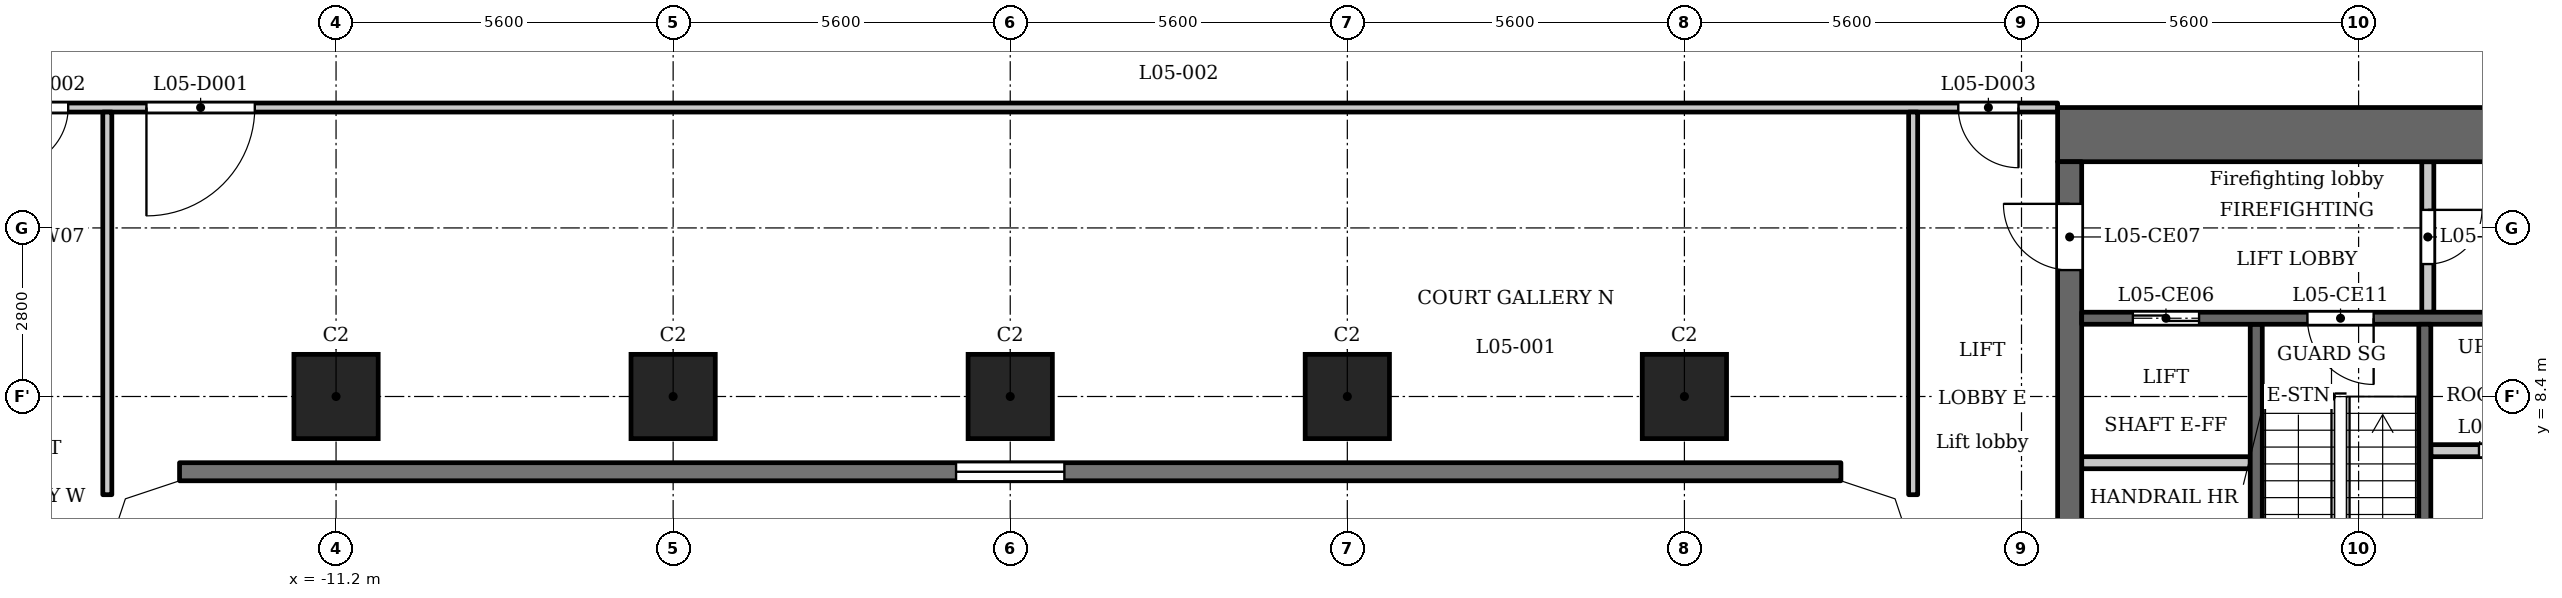
"""IFC4 building model, lengths in metres.
Left out: names, types, materials, properties, quantities, classifications, styles, units other than length and angle.
Written with IfcOpenShell. Run it as: python <this file> out.ifc"""

import sys

from ifc_helpers import new_model, si_unit, direction, frame, frame_2d, origin, origin_2d, place, context, subcontext, project, spatial, polyline, rectangle, outline, extrude, element, fill, save


model = new_model("IFC4")
c1 = context("Model", 3, precision=1e-05, world=origin(), true_north=direction((0.0, 1.0)))
c2 = subcontext(c1, "Body", "Model", "MODEL_VIEW")
j1 = project(units=[si_unit("LENGTHUNIT", "METRE"), si_unit("PLANEANGLEUNIT", "RADIAN")], contexts=[c1])
p1 = place(None, origin())
s1 = spatial("IfcSite", under=j1, at=p1, CompositionType="ELEMENT")
p2 = place(p1, origin())
s2 = spatial("IfcBuilding", under=s1, at=p2, CompositionType="ELEMENT")
p3 = place(p2, frame((0.0, 0.0, 25.7)))
s3 = spatial("IfcBuildingStorey", under=s2, at=p3, CompositionType="ELEMENT", Elevation=25.7)
for number, where, z_axis, x_axis in (
    (1, (-11.2, 8.4, 0.0), (0.0, 0.0, 1.0), (1.0, 0.0, 0.0)),
    (2, (-5.6, 8.4, 0.0), (0.0, 0.0, 1.0), (1.0, 0.0, 0.0)),
    (3, (0.0, 8.4, 0.0), (0.0, 0.0, 1.0), (1.0, 0.0, 0.0)),
    (4, (5.6, 8.4, 0.0), (0.0, 0.0, 1.0), (1.0, 0.0, 0.0)),
    (5, (11.2, 8.4, 0.0), (0.0, 0.0, 1.0), (1.0, 0.0, 0.0)),
):
    element("IfcColumn", number, at=place(p3, frame(where, z_axis=z_axis, x_axis=x_axis)), inside=s3, PredefinedType="COLUMN", context=c2, shape_type="SweptSolid", body=[
        extrude(rectangle(XDim=1.4, YDim=1.4, at=origin_2d()), origin(), (0.0, 0.0, 1.0), 4.8),
    ])
p4 = place(p3, frame((-13.8, 7.15, 0.0), z_axis=(0.0, 0.0, 1.0), x_axis=(1.0, 0.0, 0.0)))
e6 = element("IfcWall", 6, at=p4, inside=s3, PredefinedType="SOLIDWALL", context=c2, shape_type="SweptSolid", body=[
    extrude(rectangle(XDim=27.6, YDim=0.3, at=frame_2d((13.8, 0.0))), origin(), (0.0, 0.0, 1.0), 4.45),
])
p5 = place(p4, frame((12.9, 0.0, 0.9)))
e7 = element("IfcOpeningElement", 7, at=p5, cuts=e6, PredefinedType="OPENING", context=c2, shape_type="SweptSolid", body=[
    extrude(rectangle(XDim=1.8, YDim=1.25, at=frame_2d((0.9, 0.625))), frame((0.0, 0.16, 0.0), z_axis=(0.0, -1.0, 0.0), x_axis=(1.0, 0.0, 0.0)), (0.0, 0.0, 1.0), 0.32),
])
p6 = place(p3, frame((20.7, 2.6, 0.0), z_axis=(0.0, 0.0, 1.0), x_axis=(0.0, 1.0, 0.0)))
e8 = element("IfcWall", 8, at=p6, inside=s3, PredefinedType="SHEAR", context=c2, shape_type="SweptSolid", body=[
    extrude(rectangle(XDim=7.0, YDim=0.2, at=frame_2d((3.5, 0.0))), origin(), (0.0, 0.0, 1.0), 4.45),
])
p7 = place(p3, frame((17.4, 12.75, 0.0), z_axis=(0.0, 0.0, 1.0), x_axis=(1.0, 0.0, 0.0)))
e9 = element("IfcWall", 9, at=p7, inside=s3, PredefinedType="SHEAR", context=c2, shape_type="SweptSolid", body=[
    extrude(rectangle(XDim=10.4, YDim=0.9, at=frame_2d((5.2, 0.0))), origin(), (0.0, 0.0, 1.0), 4.45),
])
p8 = place(p3, frame((17.6, -12.3, 0.0), z_axis=(0.0, 0.0, 1.0), x_axis=(0.0, 1.0, 0.0)))
e10 = element("IfcWall", 10, at=p8, inside=s3, PredefinedType="SHEAR", context=c2, shape_type="SweptSolid", body=[
    extrude(rectangle(XDim=24.6, YDim=0.4, at=frame_2d((12.3, 0.0))), origin(), (0.0, 0.0, 1.0), 4.45),
])
p9 = place(p8, frame((6.0, 0.0, 0.0)))
e11 = element("IfcOpeningElement", 11, at=p9, cuts=e10, PredefinedType="OPENING", context=c2, shape_type="SweptSolid", body=[
    extrude(rectangle(XDim=1.1, YDim=2.1, at=frame_2d((0.55, 1.05))), frame((0.0, 0.21, 0.0), z_axis=(0.0, -1.0, 0.0), x_axis=(1.0, 0.0, 0.0)), (0.0, 0.0, 1.0), 0.42),
])
p10 = place(p8, frame((8.4, 0.0, 0.0)))
e12 = element("IfcOpeningElement", 12, at=p10, cuts=e10, PredefinedType="OPENING", context=c2, shape_type="SweptSolid", body=[
    extrude(rectangle(XDim=1.1, YDim=2.1, at=frame_2d((0.55, 1.05))), frame((0.0, 0.21, 0.0), z_axis=(0.0, -1.0, 0.0), x_axis=(1.0, 0.0, 0.0)), (0.0, 0.0, 1.0), 0.42),
])
p11 = place(p8, frame((10.8, 0.0, 0.0)))
e13 = element("IfcOpeningElement", 13, at=p11, cuts=e10, PredefinedType="OPENING", context=c2, shape_type="SweptSolid", body=[
    extrude(rectangle(XDim=1.1, YDim=2.1, at=frame_2d((0.55, 1.05))), frame((0.0, 0.21, 0.0), z_axis=(0.0, -1.0, 0.0), x_axis=(1.0, 0.0, 0.0)), (0.0, 0.0, 1.0), 0.42),
])
p12 = place(p8, frame((16.75, 0.0, 0.0)))
e14 = element("IfcOpeningElement", 14, at=p12, cuts=e10, PredefinedType="OPENING", context=c2, shape_type="SweptSolid", body=[
    extrude(rectangle(XDim=0.9, YDim=2.1, at=frame_2d((0.45, 1.05))), frame((0.0, 0.21, 0.0), z_axis=(0.0, -1.0, 0.0), x_axis=(1.0, 0.0, 0.0)), (0.0, 0.0, 1.0), 0.42),
])
p13 = place(p8, frame((22.8, 0.0, 0.0)))
e15 = element("IfcOpeningElement", 15, at=p13, cuts=e10, PredefinedType="OPENING", context=c2, shape_type="SweptSolid", body=[
    extrude(rectangle(XDim=1.1, YDim=2.1, at=frame_2d((0.55, 1.05))), frame((0.0, 0.21, 0.0), z_axis=(0.0, -1.0, 0.0), x_axis=(1.0, 0.0, 0.0)), (0.0, 0.0, 1.0), 0.42),
])
p14 = place(p8, frame((0.7, 0.0, 0.0)))
e16 = element("IfcOpeningElement", 16, at=p14, cuts=e10, PredefinedType="OPENING", context=c2, shape_type="SweptSolid", body=[
    extrude(rectangle(XDim=1.1, YDim=2.1, at=frame_2d((0.55, 1.05))), frame((0.0, 0.21, 0.0), z_axis=(0.0, -1.0, 0.0), x_axis=(1.0, 0.0, 0.0)), (0.0, 0.0, 1.0), 0.42),
])
p15 = place(p8, frame((12.775, 0.0, 0.0)))
e17 = element("IfcOpeningElement", 17, at=p15, cuts=e10, PredefinedType="OPENING", context=c2, shape_type="SweptSolid", body=[
    extrude(rectangle(XDim=1.8, YDim=2.1, at=frame_2d((0.9, 1.05))), frame((0.0, 0.21, 0.0), z_axis=(0.0, -1.0, 0.0), x_axis=(1.0, 0.0, 0.0)), (0.0, 0.0, 1.0), 0.42),
])
p16 = place(p3, frame((23.55, 9.8, 0.0), z_axis=(0.0, 0.0, 1.0), x_axis=(0.0, 1.0, 0.0)))
e18 = element("IfcWall", 18, at=p16, inside=s3, PredefinedType="PARTITIONING", context=c2, shape_type="SweptSolid", body=[
    extrude(rectangle(XDim=2.5, YDim=0.2, at=frame_2d((1.25, 0.0))), origin(), (0.0, 0.0, 1.0), 4.45),
])
p17 = place(p16, frame((0.8, 0.0, 0.0)))
e19 = element("IfcOpeningElement", 19, at=p17, cuts=e18, PredefinedType="OPENING", context=c2, shape_type="SweptSolid", body=[
    extrude(rectangle(XDim=0.9, YDim=2.1, at=frame_2d((0.45, 1.05))), frame((0.0, 0.11, 0.0), z_axis=(0.0, -1.0, 0.0), x_axis=(1.0, 0.0, 0.0)), (0.0, 0.0, 1.0), 0.22),
])
p18 = place(p3, frame((23.6, 7.5, 0.0), z_axis=(0.0, 0.0, 1.0), x_axis=(1.0, 0.0, 0.0)))
e20 = element("IfcWall", 20, at=p18, inside=s3, PredefinedType="PARTITIONING", context=c2, shape_type="SweptSolid", body=[
    extrude(rectangle(XDim=2.5, YDim=0.2, at=frame_2d((1.25, 0.0))), origin(), (0.0, 0.0, 1.0), 4.45),
])
p19 = place(p18, frame((0.8, 0.0, 0.0)))
e21 = element("IfcOpeningElement", 21, at=p19, cuts=e20, PredefinedType="OPENING", context=c2, shape_type="SweptSolid", body=[
    extrude(rectangle(XDim=0.9, YDim=2.1, at=frame_2d((0.45, 1.05))), frame((0.0, 0.11, 0.0), z_axis=(0.0, -1.0, 0.0), x_axis=(1.0, 0.0, 0.0)), (0.0, 0.0, 1.0), 0.22),
])
p20 = place(p3, frame((17.8, 7.3, 0.0), z_axis=(0.0, 0.0, 1.0), x_axis=(1.0, 0.0, 0.0)))
e22 = element("IfcWall", 22, at=p20, inside=s3, PredefinedType="PARTITIONING", context=c2, shape_type="SweptSolid", body=[
    extrude(rectangle(XDim=2.8, YDim=0.2, at=frame_2d((1.4, 0.0))), origin(), (0.0, 0.0, 1.0), 4.45),
])
p21 = place(p3, frame((17.8, 9.7, 0.0), z_axis=(0.0, 0.0, 1.0), x_axis=(1.0, 0.0, 0.0)))
e23 = element("IfcWall", 23, at=p21, inside=s3, PredefinedType="SHEAR", context=c2, shape_type="SweptSolid", body=[
    extrude(rectangle(XDim=8.3, YDim=0.2, at=frame_2d((4.15, 0.0))), origin(), (0.0, 0.0, 1.0), 4.45),
])
p22 = place(p21, frame((0.85, 0.0, 0.0)))
e24 = element("IfcOpeningElement", 24, at=p22, cuts=e23, PredefinedType="OPENING", context=c2, shape_type="SweptSolid", body=[
    extrude(rectangle(XDim=1.1, YDim=2.1, at=frame_2d((0.55, 1.05))), frame((0.0, 0.11, 0.0), z_axis=(0.0, -1.0, 0.0), x_axis=(1.0, 0.0, 0.0)), (0.0, 0.0, 1.0), 0.22),
])
p23 = place(p21, frame((3.75, 0.0, 0.0)))
e25 = element("IfcOpeningElement", 25, at=p23, cuts=e23, PredefinedType="OPENING", context=c2, shape_type="SweptSolid", body=[
    extrude(rectangle(XDim=1.1, YDim=2.1, at=frame_2d((0.55, 1.05))), frame((0.0, 0.11, 0.0), z_axis=(0.0, -1.0, 0.0), x_axis=(1.0, 0.0, 0.0)), (0.0, 0.0, 1.0), 0.22),
])
p24 = place(p3, frame((23.5, 2.6, 0.0), z_axis=(0.0, 0.0, 1.0), x_axis=(0.0, 1.0, 0.0)))
e26 = element("IfcWall", 26, at=p24, inside=s3, PredefinedType="SHEAR", context=c2, shape_type="SweptSolid", body=[
    extrude(rectangle(XDim=7.0, YDim=0.2, at=frame_2d((3.5, 0.0))), origin(), (0.0, 0.0, 1.0), 4.45),
])
p25 = place(p3, frame((-17.4, 13.2, 0.0), z_axis=(0.0, 0.0, 1.0), x_axis=(1.0, 0.0, 0.0)))
e27 = element("IfcWall", 27, at=p25, inside=s3, PredefinedType="PARTITIONING", context=c2, shape_type="SweptSolid", body=[
    extrude(rectangle(XDim=34.8, YDim=0.15, at=frame_2d((17.4, 0.0))), origin(), (0.0, 0.0, 1.0), 4.45),
])
p26 = place(p25, frame((3.05, 0.0, 0.0)))
e28 = element("IfcOpeningElement", 28, at=p26, cuts=e27, PredefinedType="OPENING", context=c2, shape_type="SweptSolid", body=[
    extrude(rectangle(XDim=1.8, YDim=2.1, at=frame_2d((0.9, 1.05))), frame((0.0, 0.085, 0.0), z_axis=(0.0, -1.0, 0.0), x_axis=(1.0, 0.0, 0.0)), (0.0, 0.0, 1.0), 0.17),
])
p27 = place(p25, frame((0.75, 0.0, 0.0)))
e29 = element("IfcOpeningElement", 29, at=p27, cuts=e27, PredefinedType="OPENING", context=c2, shape_type="SweptSolid", body=[
    extrude(rectangle(XDim=1.0, YDim=2.1, at=frame_2d((0.5, 1.05))), frame((0.0, 0.085, 0.0), z_axis=(0.0, -1.0, 0.0), x_axis=(1.0, 0.0, 0.0)), (0.0, 0.0, 1.0), 0.17),
])
p28 = place(p25, frame((33.15, 0.0, 0.0)))
e30 = element("IfcOpeningElement", 30, at=p28, cuts=e27, PredefinedType="OPENING", context=c2, shape_type="SweptSolid", body=[
    extrude(rectangle(XDim=1.0, YDim=2.1, at=frame_2d((0.5, 1.05))), frame((0.0, 0.085, 0.0), z_axis=(0.0, -1.0, 0.0), x_axis=(1.0, 0.0, 0.0)), (0.0, 0.0, 1.0), 0.17),
])
for number, where, z_axis, x_axis in (
    (31, (-15.0, 6.769, 0.0), (0.0, 0.0, 1.0), (0.0, 1.0, 0.0)),
    (32, (15.0, 6.769, 0.0), (0.0, 0.0, 1.0), (0.0, 1.0, 0.0)),
):
    element("IfcWall", number, at=place(p3, frame(where, z_axis=z_axis, x_axis=x_axis)), inside=s3, PredefinedType="PARTITIONING", context=c2, shape_type="SweptSolid", body=[
        extrude(rectangle(XDim=6.356, YDim=0.15, at=frame_2d((3.178, 0.0))), origin(), (0.0, 0.0, 1.0), 4.45),
    ])
p29 = place(p3, origin())
e33 = element("IfcWall", 33, at=p29, inside=s3, PredefinedType="SOLIDWALL", context=c2, shape_type="SweptSolid", body=[
    extrude(outline(polyline([(-13.849, 7.3), (-14.937, 6.937), (-15.3, 5.849), (-15.3, 5.8), (-15.0, 5.8), (-14.7, 6.7), (-13.8, 7.0), (-13.8, 7.3), (-13.849, 7.3)])), origin(), (0.0, 0.0, 1.0), 4.45),
])
e34 = element("IfcWall", 34, at=p29, inside=s3, PredefinedType="SOLIDWALL", context=c2, shape_type="SweptSolid", body=[
    extrude(outline(polyline([(14.937, 6.937), (13.849, 7.3), (13.8, 7.3), (13.8, 7.0), (14.7, 6.7), (15.0, 5.8), (15.3, 5.8), (15.3, 5.849), (14.937, 6.937)])), origin(), (0.0, 0.0, 1.0), 4.45),
])
p30 = place(p22, origin())
e35 = element("IfcDoor", 35, at=p30, inside=s3, OperationType="DOUBLE_DOOR_SLIDING", PredefinedType="DOOR", context=c2, shape_type="SweptSolid", body=[
    extrude(rectangle(XDim=1.1, YDim=2.1, at=frame_2d((0.55, 1.05))), frame((0.0, 0.025, 0.0), z_axis=(0.0, -1.0, 0.0), x_axis=(1.0, 0.0, 0.0)), (0.0, 0.0, 1.0), 0.05),
])
fill(e24, e35)
p31 = place(p13, origin())
e36 = element("IfcDoor", 36, at=p31, inside=s3, OperationType="SINGLE_SWING_LEFT", PredefinedType="DOOR", context=c2, shape_type="SweptSolid", body=[
    extrude(rectangle(XDim=1.1, YDim=2.1, at=frame_2d((0.55, 1.05))), frame((0.0, 0.025, 0.0), z_axis=(0.0, -1.0, 0.0), x_axis=(1.0, 0.0, 0.0)), (0.0, 0.0, 1.0), 0.05),
])
fill(e15, e36)
p32 = place(p17, origin())
e37 = element("IfcDoor", 37, at=p32, inside=s3, OperationType="SINGLE_SWING_RIGHT", PredefinedType="DOOR", context=c2, shape_type="SweptSolid", body=[
    extrude(rectangle(XDim=0.9, YDim=2.1, at=frame_2d((0.45, 1.05))), frame((0.0, 0.025, 0.0), z_axis=(0.0, -1.0, 0.0), x_axis=(1.0, 0.0, 0.0)), (0.0, 0.0, 1.0), 0.05),
])
fill(e19, e37)
p33 = place(p23, origin())
e38 = element("IfcDoor", 38, at=p33, inside=s3, OperationType="SINGLE_SWING_RIGHT", PredefinedType="DOOR", context=c2, shape_type="SweptSolid", body=[
    extrude(rectangle(XDim=1.1, YDim=2.1, at=frame_2d((0.55, 1.05))), frame((0.0, 0.025, 0.0), z_axis=(0.0, -1.0, 0.0), x_axis=(1.0, 0.0, 0.0)), (0.0, 0.0, 1.0), 0.05),
])
fill(e25, e38)
p34 = place(p19, origin())
e39 = element("IfcDoor", 39, at=p34, inside=s3, OperationType="SINGLE_SWING_LEFT", PredefinedType="DOOR", context=c2, shape_type="SweptSolid", body=[
    extrude(rectangle(XDim=0.9, YDim=2.1, at=frame_2d((0.45, 1.05))), frame((0.0, 0.025, 0.0), z_axis=(0.0, -1.0, 0.0), x_axis=(1.0, 0.0, 0.0)), (0.0, 0.0, 1.0), 0.05),
])
fill(e21, e39)
p35 = place(p26, origin())
e40 = element("IfcDoor", 40, at=p35, inside=s3, OperationType="SINGLE_SWING_LEFT", PredefinedType="DOOR", context=c2, shape_type="SweptSolid", body=[
    extrude(rectangle(XDim=1.8, YDim=2.1, at=frame_2d((0.9, 1.05))), frame((0.0, 0.025, 0.0), z_axis=(0.0, -1.0, 0.0), x_axis=(1.0, 0.0, 0.0)), (0.0, 0.0, 1.0), 0.05),
])
fill(e28, e40)
p36 = place(p27, origin())
e41 = element("IfcDoor", 41, at=p36, inside=s3, OperationType="SINGLE_SWING_LEFT", PredefinedType="DOOR", context=c2, shape_type="SweptSolid", body=[
    extrude(rectangle(XDim=1.0, YDim=2.1, at=frame_2d((0.5, 1.05))), frame((0.0, 0.025, 0.0), z_axis=(0.0, -1.0, 0.0), x_axis=(1.0, 0.0, 0.0)), (0.0, 0.0, 1.0), 0.05),
])
fill(e29, e41)
p37 = place(p28, origin())
e42 = element("IfcDoor", 42, at=p37, inside=s3, OperationType="SINGLE_SWING_RIGHT", PredefinedType="DOOR", context=c2, shape_type="SweptSolid", body=[
    extrude(rectangle(XDim=1.0, YDim=2.1, at=frame_2d((0.5, 1.05))), frame((0.0, 0.025, 0.0), z_axis=(0.0, -1.0, 0.0), x_axis=(1.0, 0.0, 0.0)), (0.0, 0.0, 1.0), 0.05),
])
fill(e30, e42)
p38 = place(p5, origin())
e43 = element("IfcWindow", 43, at=p38, inside=s3, PartitioningType="SINGLE_PANEL", PredefinedType="WINDOW", context=c2, shape_type="SweptSolid", body=[
    extrude(rectangle(XDim=1.8, YDim=1.25, at=frame_2d((0.9, 0.625))), frame((0.0, 0.03, 0.0), z_axis=(0.0, -1.0, 0.0), x_axis=(1.0, 0.0, 0.0)), (0.0, 0.0, 1.0), 0.06),
])
fill(e7, e43)
save(model, sys.argv[1])
